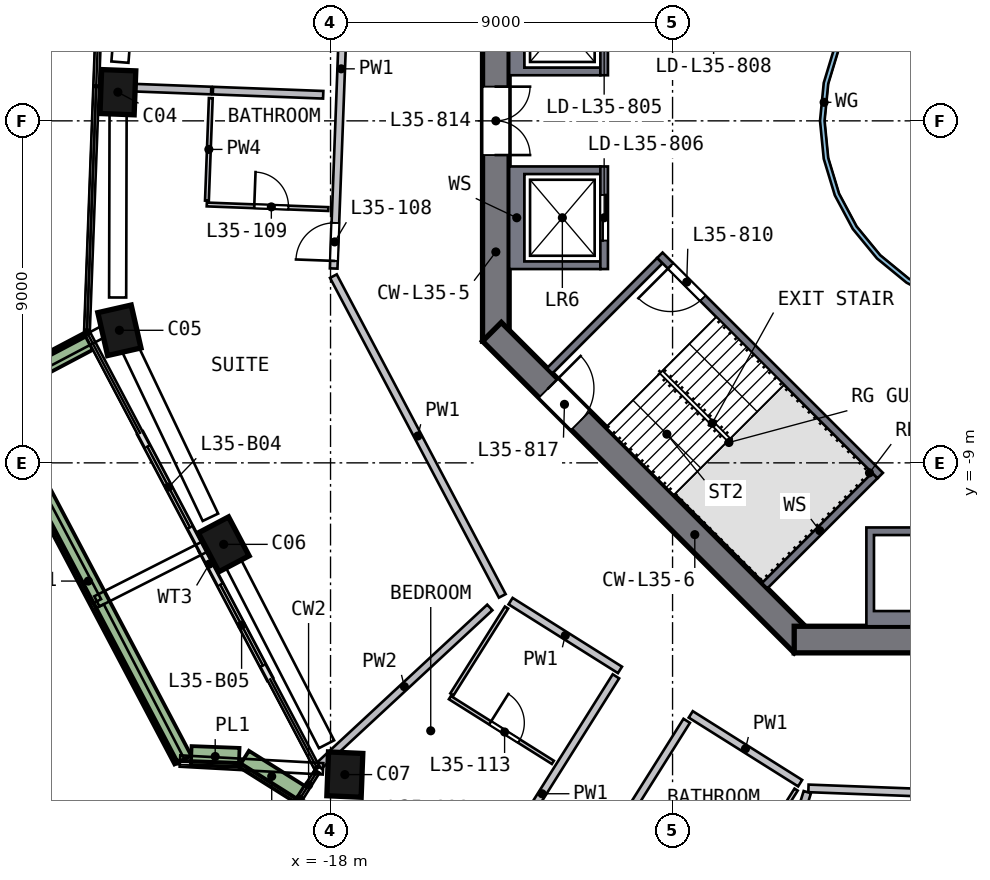
"""IFC4 building model, lengths in metres.
Left out: names, types, materials, properties, quantities, classifications, styles, units other than length and angle.
Written with IfcOpenShell. Run it as: python <this file> out.ifc"""

import sys

from ifc_helpers import new_model, si_unit, direction, frame, frame_2d, origin, origin_2d, place, context, subcontext, project, spatial, polyline, rectangle, outline, extrude, element, fill, save


model = new_model("IFC4")
c1 = context("Model", 3, precision=1e-05, world=origin(), true_north=direction((0.0, 1.0)))
c2 = subcontext(c1, "Body", "Model", "MODEL_VIEW")
j1 = project(units=[si_unit("LENGTHUNIT", "METRE"), si_unit("PLANEANGLEUNIT", "RADIAN")], contexts=[c1])
p1 = place(None, origin())
s1 = spatial("IfcSite", under=j1, at=p1, CompositionType="ELEMENT")
p2 = place(p1, origin())
s2 = spatial("IfcBuilding", under=s1, at=p2, CompositionType="ELEMENT")
p3 = place(p2, frame((0.0, 0.0, 147.0)))
s3 = spatial("IfcBuildingStorey", under=s2, at=p3, CompositionType="ELEMENT", Elevation=147.0)
p4 = place(p3, frame((-23.592, 0.89, 0.0), z_axis=(-0.003270139, -0.112325487, 0.993666086), x_axis=(-0.037343403, -0.992964581, -0.112369084)))
e1 = element("IfcColumn", 1, at=p4, inside=s3, PredefinedType="COLUMN", context=c2, shape_type="SweptSolid", body=[
    extrude(rectangle(XDim=1.15, YDim=0.9, at=origin_2d()), origin(), (0.0, 0.0, 1.0), 3.21),
])
p5 = place(p3, frame((-23.588, -5.376, 0.0), z_axis=(0.026457095, -0.111986495, 0.993357462), x_axis=(-0.220180272, 0.968648872, 0.115065247)))
e2 = element("IfcColumn", 2, at=p5, inside=s3, PredefinedType="COLUMN", context=c2, shape_type="SweptSolid", body=[
    extrude(rectangle(XDim=1.15, YDim=0.9, at=origin_2d()), origin(), (0.0, 0.0, 1.0), 3.211),
])
p6 = place(p3, frame((-20.876, -11.025, 0.0), z_axis=(0.053235348, -0.098865646, 0.993675793), x_axis=(0.463661004, -0.878869132, -0.112283222)))
e3 = element("IfcColumn", 3, at=p6, inside=s3, PredefinedType="COLUMN", context=c2, shape_type="SweptSolid", body=[
    extrude(rectangle(XDim=1.15, YDim=0.9, at=origin_2d()), origin(), (0.0, 0.0, 1.0), 3.21),
])
p7 = place(p3, frame((-17.723, -17.103, 0.0), z_axis=(0.082012432, -0.083608596, 0.993118102), x_axis=(0.044637607, 0.9957831, 0.08014675)))
e4 = element("IfcColumn", 4, at=p7, inside=s3, PredefinedType="COLUMN", context=c2, shape_type="SweptSolid", body=[
    extrude(rectangle(XDim=1.15, YDim=0.9, at=origin_2d()), origin(), (0.0, 0.0, 1.0), 3.212),
])
p8 = place(p3, frame((-13.65, 5.799, 0.0), z_axis=(0.0, 0.0, 1.0), x_axis=(0.0, -1.0, 0.0)))
e5 = element("IfcWall", 5, at=p8, inside=s3, PredefinedType="SHEAR", context=c2, shape_type="SweptSolid", body=[
    extrude(rectangle(XDim=11.598, YDim=0.7, at=frame_2d((5.799, 0.0))), origin(), (0.0, 0.0, 1.0), 3.5),
])
p9 = place(p8, frame((4.899, 0.0, 0.0)))
e6 = element("IfcOpeningElement", 6, at=p9, cuts=e5, PredefinedType="OPENING", context=c2, shape_type="SweptSolid", body=[
    extrude(rectangle(XDim=1.8, YDim=2.1, at=frame_2d((0.9, 1.05))), frame((0.0, 0.36, 0.0), z_axis=(0.0, -1.0, 0.0), x_axis=(1.0, 0.0, 0.0)), (0.0, 0.0, 1.0), 0.72),
])
p10 = place(p3, frame((-13.752, -5.552, 0.0), z_axis=(0.0, 0.0, 1.0), x_axis=(0.707106781, -0.707106781, 0.0)))
e7 = element("IfcWall", 7, at=p10, inside=s3, PredefinedType="SHEAR", context=c2, shape_type="SweptSolid", body=[
    extrude(rectangle(XDim=11.598, YDim=0.7, at=frame_2d((5.799, 0.0))), origin(), (0.0, 0.0, 1.0), 3.5),
])
p11 = place(p10, frame((2.099, 0.0, 0.0)))
e8 = element("IfcOpeningElement", 8, at=p11, cuts=e7, PredefinedType="OPENING", context=c2, shape_type="SweptSolid", body=[
    extrude(rectangle(XDim=1.2, YDim=2.1, at=frame_2d((0.6, 1.05))), frame((0.0, 0.36, 0.0), z_axis=(0.0, -1.0, 0.0), x_axis=(1.0, 0.0, 0.0)), (0.0, 0.0, 1.0), 0.72),
])
p12 = place(p3, frame((-5.799, -13.65, 0.0), z_axis=(0.0, 0.0, 1.0), x_axis=(1.0, 0.0, 0.0)))
e9 = element("IfcWall", 9, at=p12, inside=s3, PredefinedType="SHEAR", context=c2, shape_type="SweptSolid", body=[
    extrude(rectangle(XDim=11.598, YDim=0.7, at=frame_2d((5.799, 0.0))), origin(), (0.0, 0.0, 1.0), 3.5),
])
p13 = place(p12, frame((4.899, 0.0, 0.0)))
e10 = element("IfcOpeningElement", 10, at=p13, cuts=e9, PredefinedType="OPENING", context=c2, shape_type="SweptSolid", body=[
    extrude(rectangle(XDim=1.8, YDim=2.1, at=frame_2d((0.9, 1.05))), frame((0.0, 0.36, 0.0), z_axis=(0.0, -1.0, 0.0), x_axis=(1.0, 0.0, 0.0)), (0.0, 0.0, 1.0), 0.72),
])
p14 = place(p3, frame((-18.907, -17.859, 0.0), z_axis=(0.0, 0.0, 1.0), x_axis=(0.846576204, -0.532267537, 0.0)))
e11 = element("IfcWall", 11, at=p14, inside=s3, PredefinedType="SOLIDWALL", context=c2, shape_type="SweptSolid", body=[
    extrude(rectangle(XDim=1.875, YDim=0.15, at=frame_2d((0.938, 0.0))), origin(), (0.0, 0.0, 1.0), 3.19),
])
p15 = place(p3, frame((-23.007, -8.221, 0.0), z_axis=(0.0, 0.0, 1.0), x_axis=(0.466999775, -0.884257434, 0.0)))
e12 = element("IfcWall", 12, at=p15, inside=s3, PredefinedType="SOLIDWALL", context=c2, shape_type="SweptSolid", body=[
    extrude(rectangle(XDim=3.475, YDim=0.15, at=frame_2d((1.737, 0.0))), origin(), (0.0, 0.0, 1.0), 2.475),
])
p16 = place(p15, frame((0.4, 0.0, 0.0)))
e13 = element("IfcOpeningElement", 13, at=p16, cuts=e12, PredefinedType="OPENING", context=c2, shape_type="SweptSolid", body=[
    extrude(rectangle(XDim=2.4, YDim=2.4, at=frame_2d((1.2, 1.2))), frame((0.0, 0.085, 0.0), z_axis=(0.0, -1.0, 0.0), x_axis=(1.0, 0.0, 0.0)), (0.0, 0.0, 1.0), 0.17),
])
p17 = place(p3, frame((-21.384, -11.294, 0.0), z_axis=(0.0, 0.0, 1.0), x_axis=(0.467013054, -0.884250421, 0.0)))
e14 = element("IfcWall", 14, at=p17, inside=s3, PredefinedType="SOLIDWALL", context=c2, shape_type="SweptSolid", body=[
    extrude(rectangle(XDim=3.835, YDim=0.15, at=frame_2d((1.918, 0.0))), origin(), (0.0, 0.0, 1.0), 2.475),
])
p18 = place(p17, frame((1.035, 0.0, 0.0)))
e15 = element("IfcOpeningElement", 15, at=p18, cuts=e14, PredefinedType="OPENING", context=c2, shape_type="SweptSolid", body=[
    extrude(rectangle(XDim=2.4, YDim=2.4, at=frame_2d((1.2, 1.2))), frame((0.0, 0.085, 0.0), z_axis=(0.0, -1.0, 0.0), x_axis=(1.0, 0.0, 0.0)), (0.0, 0.0, 1.0), 0.17),
])
p19 = place(p3, frame((-24.37, -5.802, 0.0), z_axis=(0.0, 0.0, 1.0), x_axis=(-0.884238577, -0.467035479, 0.0)))
e16 = element("IfcWall", 16, at=p19, inside=s3, PredefinedType="SOLIDWALL", context=c2, shape_type="SweptSolid", body=[
    extrude(rectangle(XDim=3.199, YDim=0.5, at=frame_2d((1.6, 0.0))), origin(), (0.0, 0.0, 1.0), 0.7),
])
p20 = place(p3, frame((-26.861, -7.401, 0.0), z_axis=(0.0, 0.0, 1.0), x_axis=(0.466996617, -0.884259102, 0.0)))
e17 = element("IfcWall", 17, at=p20, inside=s3, PredefinedType="SOLIDWALL", context=c2, shape_type="SweptSolid", body=[
    extrude(rectangle(XDim=10.652, YDim=0.5, at=frame_2d((5.326, 0.0))), origin(), (0.0, 0.0, 1.0), 0.7),
])
p21 = place(p3, frame((-21.665, -16.704, 0.0), z_axis=(0.0, 0.0, 1.0), x_axis=(0.999288074, -0.037727236, 0.0)))
e18 = element("IfcWall", 18, at=p21, inside=s3, PredefinedType="SOLIDWALL", context=c2, shape_type="SweptSolid", body=[
    extrude(rectangle(XDim=1.262, YDim=0.5, at=frame_2d((0.631, 0.0))), origin(), (0.0, 0.0, 1.0), 0.7),
])
p22 = place(p3, frame((-20.281, -16.789, 0.0), z_axis=(0.0, 0.0, 1.0), x_axis=(0.846553018, -0.532304413, 0.0)))
e19 = element("IfcWall", 19, at=p22, inside=s3, PredefinedType="SOLIDWALL", context=c2, shape_type="SweptSolid", body=[
    extrude(rectangle(XDim=1.731, YDim=0.5, at=frame_2d((0.865, 0.0))), origin(), (0.0, 0.0, 1.0), 0.7),
])
p23 = place(p3, origin())
e20 = element("IfcWall", 20, at=p23, inside=s3, PredefinedType="SOLIDWALL", context=c2, shape_type="SweptSolid", body=[
    extrude(outline(polyline([(-13.3, 3.9), (-10.9, 3.9), (-10.9, 3.7), (-12.9, 3.7), (-12.9, 1.4), (-10.9, 1.4), (-10.9, 1.2), (-13.3, 1.2), (-13.3, 3.9)])), origin(), (0.0, 0.0, 1.0), 3.19),
])
p24 = place(p3, frame((-10.8, 1.2, 0.0), z_axis=(0.0, 0.0, 1.0), x_axis=(0.0, 1.0, 0.0)))
e21 = element("IfcWall", 21, at=p24, inside=s3, PredefinedType="SOLIDWALL", context=c2, shape_type="SweptSolid", body=[
    extrude(rectangle(XDim=2.7, YDim=0.2, at=frame_2d((1.35, 0.0))), origin(), (0.0, 0.0, 1.0), 3.19),
])
p25 = place(p24, frame((0.75, 0.0, 0.0)))
e22 = element("IfcOpeningElement", 22, at=p25, cuts=e21, PredefinedType="OPENING", context=c2, shape_type="SweptSolid", body=[
    extrude(rectangle(XDim=1.2, YDim=2.1, at=frame_2d((0.6, 1.05))), frame((0.0, 0.11, 0.0), z_axis=(0.0, -1.0, 0.0), x_axis=(1.0, 0.0, 0.0)), (0.0, 0.0, 1.0), 0.22),
])
p26 = place(p3, origin())
e23 = element("IfcWall", 23, at=p26, inside=s3, PredefinedType="SOLIDWALL", context=c2, shape_type="SweptSolid", body=[
    extrude(outline(polyline([(-13.3, -3.9), (-13.3, -1.2), (-10.9, -1.2), (-10.9, -1.4), (-12.9, -1.4), (-12.9, -3.7), (-10.9, -3.7), (-10.9, -3.9), (-13.3, -3.9)])), origin(), (0.0, 0.0, 1.0), 3.19),
])
p27 = place(p3, frame((-10.8, -1.2, 0.0), z_axis=(0.0, 0.0, 1.0), x_axis=(0.0, -1.0, 0.0)))
e24 = element("IfcWall", 24, at=p27, inside=s3, PredefinedType="SOLIDWALL", context=c2, shape_type="SweptSolid", body=[
    extrude(rectangle(XDim=2.7, YDim=0.2, at=frame_2d((1.35, 0.0))), origin(), (0.0, 0.0, 1.0), 3.19),
])
p28 = place(p27, frame((0.75, 0.0, 0.0)))
e25 = element("IfcOpeningElement", 25, at=p28, cuts=e24, PredefinedType="OPENING", context=c2, shape_type="SweptSolid", body=[
    extrude(rectangle(XDim=1.2, YDim=2.1, at=frame_2d((0.6, 1.05))), frame((0.0, 0.11, 0.0), z_axis=(0.0, -1.0, 0.0), x_axis=(1.0, 0.0, 0.0)), (0.0, 0.0, 1.0), 0.22),
])
p29 = place(p3, origin())
e26 = element("IfcWall", 26, at=p29, inside=s3, PredefinedType="SOLIDWALL", context=c2, shape_type="SweptSolid", body=[
    extrude(outline(polyline([(-1.2, -13.3), (-3.9, -13.3), (-3.9, -10.7), (-1.2, -10.7), (-1.2, -13.3)]), holes=[polyline([(-3.7, -10.9), (-3.7, -12.9), (-1.4, -12.9), (-1.4, -10.9), (-3.7, -10.9)])]), origin(), (0.0, 0.0, 1.0), 3.19),
])
p30 = place(p3, frame((-3.535, -9.334, 0.0), z_axis=(0.0, 0.0, 1.0), x_axis=(-0.707106781, 0.707106781, 0.0)))
e27 = element("IfcWall", 27, at=p30, inside=s3, PredefinedType="SOLIDWALL", context=c2, shape_type="SweptSolid", body=[
    extrude(rectangle(XDim=8.2, YDim=0.2, at=frame_2d((4.1, 0.0))), origin(), (0.0, 0.0, 1.0), 3.19),
])
p31 = place(p30, frame((6.6, 0.0, 0.0)))
e28 = element("IfcOpeningElement", 28, at=p31, cuts=e27, PredefinedType="OPENING", context=c2, shape_type="SweptSolid", body=[
    extrude(rectangle(XDim=1.2, YDim=2.1, at=frame_2d((0.6, 1.05))), frame((0.0, 0.11, 0.0), z_axis=(0.0, -1.0, 0.0), x_axis=(1.0, 0.0, 0.0)), (0.0, 0.0, 1.0), 0.22),
])
for number, where, z_axis, x_axis in (
    (29, (-9.334, -3.677, 0.0), (0.0, 0.0, 1.0), (-0.707, -0.707, 0.0)),
    (30, (-3.677, -9.334, 0.0), (0.0, 0.0, 1.0), (-0.707, -0.707, 0.0)),
):
    element("IfcWall", number, at=place(p3, frame(where, z_axis=z_axis, x_axis=x_axis)), inside=s3, PredefinedType="SOLIDWALL", context=c2, shape_type="SweptSolid", body=[
        extrude(rectangle(XDim=4.1, YDim=0.2, at=frame_2d((2.05, 0.0))), origin(), (0.0, 0.0, 1.0), 3.19),
    ])
p32 = place(p3, origin())
e31 = element("IfcWall", 31, at=p32, inside=s3, PredefinedType="SOLIDWALL", context=c2, shape_type="SweptSolid", body=[
    extrude(outline(polyline([(5.021, -0.999), (4.73, -1.959), (4.257, -2.844), (3.62, -3.62), (2.844, -4.257), (1.959, -4.73), (0.999, -5.021), (0.0, -5.12), (-0.999, -5.021), (-1.959, -4.73), (-2.844, -4.257), (-3.62, -3.62), (-4.257, -2.844), (-4.73, -1.959), (-5.021, -0.999), (-5.12, 0.0), (-5.021, 0.999), (-4.73, 1.959), (-4.257, 2.844), (-3.62, 3.62), (-2.844, 4.257), (-1.959, 4.73), (-0.999, 5.021), (0.0, 5.12), (0.999, 5.021), (1.959, 4.73), (2.844, 4.257), (3.62, 3.62), (4.257, 2.844), (4.73, 1.959), (5.021, 0.999), (5.12, 0.0), (5.021, -0.999)]), holes=[polyline([(4.904, 0.976), (4.619, 1.913), (4.157, 2.778), (3.535, 3.535), (2.778, 4.157), (1.913, 4.619), (0.976, 4.904), (0.0, 5.0), (-0.976, 4.904), (-1.913, 4.619), (-2.778, 4.157), (-3.535, 3.535), (-4.157, 2.778), (-4.619, 1.913), (-4.904, 0.976), (-5.0, 0.0), (-4.904, -0.976), (-4.619, -1.913), (-4.157, -2.778), (-3.535, -3.535), (-2.778, -4.157), (-1.913, -4.619), (-0.976, -4.904), (0.0, -5.0), (0.976, -4.904), (1.913, -4.619), (2.778, -4.157), (3.535, -3.535), (4.157, -2.778), (4.619, -1.913), (4.904, -0.976), (5.0, 0.0), (4.904, 0.976)])]), origin(), (0.0, 0.0, 1.0), 3.19),
])
p33 = place(p3, frame((-17.917, -3.885, 0.0), z_axis=(0.0, 0.0, 1.0), x_axis=(0.037683274, 0.999289733, 0.0)))
e32 = element("IfcWall", 32, at=p33, inside=s3, PredefinedType="SOLIDWALL", context=c2, shape_type="SweptSolid", body=[
    extrude(rectangle(XDim=9.116, YDim=0.2, at=frame_2d((4.558, 0.0))), origin(), (0.0, 0.0, 1.0), 3.19),
])
p34 = place(p33, frame((0.2, 0.0, 0.0)))
e33 = element("IfcOpeningElement", 33, at=p34, cuts=e32, PredefinedType="OPENING", context=c2, shape_type="SweptSolid", body=[
    extrude(rectangle(XDim=1.0, YDim=2.1, at=frame_2d((0.5, 1.05))), frame((0.0, 0.11, 0.0), z_axis=(0.0, -1.0, 0.0), x_axis=(1.0, 0.0, 0.0)), (0.0, 0.0, 1.0), 0.22),
])
p35 = place(p3, frame((-17.925, -4.086, 0.0), z_axis=(0.0, 0.0, 1.0), x_axis=(0.467011659, -0.884251158, 0.0)))
e34 = element("IfcWall", 34, at=p35, inside=s3, PredefinedType="SOLIDWALL", context=c2, shape_type="SweptSolid", body=[
    extrude(rectangle(XDim=9.516, YDim=0.2, at=frame_2d((4.758, 0.0))), origin(), (0.0, 0.0, 1.0), 3.19),
])
p36 = place(p3, frame((-10.49, -14.617, 0.0), z_axis=(0.0, 0.0, 1.0), x_axis=(-0.532290716, -0.84656163, 0.0)))
e35 = element("IfcWall", 35, at=p36, inside=s3, PredefinedType="SOLIDWALL", context=c2, shape_type="SweptSolid", body=[
    extrude(rectangle(XDim=7.3, YDim=0.2, at=frame_2d((3.65, 0.0))), origin(), (0.0, 0.0, 1.0), 3.19),
])
p37 = place(p3, frame((-13.262, -12.638, 0.0), z_axis=(0.0, 0.0, 1.0), x_axis=(0.846546871, -0.532314188, 0.0)))
e36 = element("IfcWall", 36, at=p37, inside=s3, PredefinedType="SOLIDWALL", context=c2, shape_type="SweptSolid", body=[
    extrude(rectangle(XDim=3.4, YDim=0.2, at=frame_2d((1.7, 0.0))), origin(), (0.0, 0.0, 1.0), 3.19),
])
p38 = place(p3, frame((-12.513, -21.968, 0.0), z_axis=(0.0, 0.0, 1.0), x_axis=(0.532290716, 0.84656163, 0.0)))
e37 = element("IfcWall", 37, at=p38, inside=s3, PredefinedType="SOLIDWALL", context=c2, shape_type="SweptSolid", body=[
    extrude(rectangle(XDim=7.3, YDim=0.2, at=frame_2d((3.65, 0.0))), origin(), (0.0, 0.0, 1.0), 3.19),
])
p39 = place(p3, frame((-8.521, -15.619, 0.0), z_axis=(0.0, 0.0, 1.0), x_axis=(0.846546871, -0.532314188, 0.0)))
e38 = element("IfcWall", 38, at=p39, inside=s3, PredefinedType="SOLIDWALL", context=c2, shape_type="SweptSolid", body=[
    extrude(rectangle(XDim=3.4, YDim=0.2, at=frame_2d((1.7, 0.0))), origin(), (0.0, 0.0, 1.0), 3.19),
])
p40 = place(p3, frame((4.086, -17.925, 0.0), z_axis=(0.0, 0.0, 1.0), x_axis=(-0.999289656, 0.037685326, 0.0)))
e39 = element("IfcWall", 39, at=p40, inside=s3, PredefinedType="SOLIDWALL", context=c2, shape_type="SweptSolid", body=[
    extrude(rectangle(XDim=9.517, YDim=0.2, at=frame_2d((4.758, 0.0))), origin(), (0.0, 0.0, 1.0), 3.19),
])
p41 = place(p40, frame((1.9, 0.0, 0.0)))
e40 = element("IfcOpeningElement", 40, at=p41, cuts=e39, PredefinedType="OPENING", context=c2, shape_type="SweptSolid", body=[
    extrude(rectangle(XDim=1.0, YDim=2.1, at=frame_2d((0.5, 1.05))), frame((0.0, 0.11, 0.0), z_axis=(0.0, -1.0, 0.0), x_axis=(1.0, 0.0, 0.0)), (0.0, 0.0, 1.0), 0.22),
])
p42 = place(p3, frame((-21.141, 0.797, 0.0), z_axis=(0.0, 0.0, 1.0), x_axis=(-0.999288645, 0.037712126, 0.0)))
e41 = element("IfcWall", 41, at=p42, inside=s3, PredefinedType="SOLIDWALL", context=c2, shape_type="SweptSolid", body=[
    extrude(rectangle(XDim=2.952, YDim=0.2, at=frame_2d((1.476, 0.0))), origin(), (0.0, 0.0, 1.0), 3.19),
])
p43 = place(p3, frame((-18.193, 0.686, 0.0), z_axis=(0.0, 0.0, 1.0), x_axis=(-0.999290793, 0.037655167, 0.0)))
e42 = element("IfcWall", 42, at=p43, inside=s3, PredefinedType="SOLIDWALL", context=c2, shape_type="SweptSolid", body=[
    extrude(rectangle(XDim=2.905, YDim=0.2, at=frame_2d((1.452, 0.0))), origin(), (0.0, 0.0, 1.0), 3.19),
])
p44 = place(p3, frame((-13.809, -12.805, 0.0), z_axis=(0.0, 0.0, 1.0), x_axis=(-0.733259856, -0.679948516, 0.0)))
e43 = element("IfcWall", 43, at=p44, inside=s3, PredefinedType="SOLIDWALL", context=c2, shape_type="SweptSolid", body=[
    extrude(rectangle(XDim=6.132, YDim=0.2, at=frame_2d((3.066, 0.0))), origin(), (0.0, 0.0, 1.0), 3.19),
])
p45 = place(p3, frame((-5.455, -17.665, 0.0), z_axis=(0.0, 0.0, 1.0), x_axis=(-0.2950443, -0.955483574, 0.0)))
e44 = element("IfcWall", 44, at=p45, inside=s3, PredefinedType="SOLIDWALL", context=c2, shape_type="SweptSolid", body=[
    extrude(rectangle(XDim=3.418, YDim=0.2, at=frame_2d((1.709, 0.0))), origin(), (0.0, 0.0, 1.0), 3.19),
])
p46 = place(p3, frame((-21.253, -2.101, 0.0), z_axis=(0.0, 0.0, 1.0), x_axis=(0.037703899, 0.999288955, 0.0)))
e45 = element("IfcWall", 45, at=p46, inside=s3, PredefinedType="PARTITIONING", context=c2, shape_type="SweptSolid", body=[
    extrude(rectangle(XDim=2.7, YDim=0.1, at=frame_2d((1.35, 0.0))), origin(), (0.0, 0.0, 1.0), 3.19),
])
p47 = place(p3, frame((-21.256, -2.2, 0.0), z_axis=(0.0, 0.0, 1.0), x_axis=(0.999289522, -0.037688886, 0.0)))
e46 = element("IfcWall", 46, at=p47, inside=s3, PredefinedType="PARTITIONING", context=c2, shape_type="SweptSolid", body=[
    extrude(rectangle(XDim=3.2, YDim=0.1, at=frame_2d((1.6, 0.0))), origin(), (0.0, 0.0, 1.0), 3.19),
])
p48 = place(p47, frame((1.25, 0.0, 0.0)))
e47 = element("IfcOpeningElement", 47, at=p48, cuts=e46, PredefinedType="OPENING", context=c2, shape_type="SweptSolid", body=[
    extrude(rectangle(XDim=0.9, YDim=2.1, at=frame_2d((0.45, 1.05))), frame((0.0, 0.06, 0.0), z_axis=(0.0, -1.0, 0.0), x_axis=(1.0, 0.0, 0.0)), (0.0, 0.0, 1.0), 0.12),
])
p49 = place(p3, frame((-13.368, -12.808, 0.0), z_axis=(0.0, 0.0, 1.0), x_axis=(-0.532321537, -0.84654225, 0.0)))
e48 = element("IfcWall", 48, at=p49, inside=s3, PredefinedType="PARTITIONING", context=c2, shape_type="SweptSolid", body=[
    extrude(rectangle(XDim=2.7, YDim=0.1, at=frame_2d((1.35, 0.0))), origin(), (0.0, 0.0, 1.0), 3.19),
])
p50 = place(p3, frame((-14.859, -15.178, 0.0), z_axis=(0.0, 0.0, 1.0), x_axis=(0.846555022, -0.532301225, 0.0)))
e49 = element("IfcWall", 49, at=p50, inside=s3, PredefinedType="PARTITIONING", context=c2, shape_type="SweptSolid", body=[
    extrude(rectangle(XDim=3.2, YDim=0.1, at=frame_2d((1.6, 0.0))), origin(), (0.0, 0.0, 1.0), 3.19),
])
p51 = place(p50, frame((1.25, 0.0, 0.0)))
e50 = element("IfcOpeningElement", 50, at=p51, cuts=e49, PredefinedType="OPENING", context=c2, shape_type="SweptSolid", body=[
    extrude(rectangle(XDim=0.9, YDim=2.1, at=frame_2d((0.45, 1.05))), frame((0.0, 0.06, 0.0), z_axis=(0.0, -1.0, 0.0), x_axis=(1.0, 0.0, 0.0)), (0.0, 0.0, 1.0), 0.12),
])
p52 = place(p3, frame((-7.187, -19.884, 0.0), z_axis=(0.0, 0.0, 1.0), x_axis=(0.532256732, 0.846582997, 0.0)))
e51 = element("IfcWall", 51, at=p52, inside=s3, PredefinedType="PARTITIONING", context=c2, shape_type="SweptSolid", body=[
    extrude(rectangle(XDim=2.7, YDim=0.1, at=frame_2d((1.35, 0.0))), origin(), (0.0, 0.0, 1.0), 3.19),
])
p53 = place(p16, origin())
e52 = element("IfcDoor", 52, at=p53, inside=s3, OperationType="SLIDING_TO_RIGHT", PredefinedType="DOOR", context=c2, shape_type="SweptSolid", body=[
    extrude(rectangle(XDim=2.4, YDim=2.4, at=frame_2d((1.2, 1.2))), frame((0.0, 0.025, 0.0), z_axis=(0.0, -1.0, 0.0), x_axis=(1.0, 0.0, 0.0)), (0.0, 0.0, 1.0), 0.05),
])
fill(e13, e52)
p54 = place(p18, origin())
e53 = element("IfcDoor", 53, at=p54, inside=s3, OperationType="SLIDING_TO_LEFT", PredefinedType="DOOR", context=c2, shape_type="SweptSolid", body=[
    extrude(rectangle(XDim=2.4, YDim=2.4, at=frame_2d((1.2, 1.2))), frame((0.0, 0.025, 0.0), z_axis=(0.0, -1.0, 0.0), x_axis=(1.0, 0.0, 0.0)), (0.0, 0.0, 1.0), 0.05),
])
fill(e15, e53)
p55 = place(p28, origin())
e54 = element("IfcDoor", 54, at=p55, inside=s3, OperationType="DOUBLE_DOOR_SLIDING", PredefinedType="DOOR", context=c2, shape_type="SweptSolid", body=[
    extrude(rectangle(XDim=1.2, YDim=2.1, at=frame_2d((0.6, 1.05))), frame((0.0, 0.025, 0.0), z_axis=(0.0, -1.0, 0.0), x_axis=(1.0, 0.0, 0.0)), (0.0, 0.0, 1.0), 0.05),
])
fill(e25, e54)
p56 = place(p31, origin())
e55 = element("IfcDoor", 55, at=p56, inside=s3, OperationType="SINGLE_SWING_RIGHT", PredefinedType="DOOR", context=c2, shape_type="SweptSolid", body=[
    extrude(rectangle(XDim=1.2, YDim=2.1, at=frame_2d((0.6, 1.05))), frame((0.0, 0.025, 0.0), z_axis=(0.0, -1.0, 0.0), x_axis=(1.0, 0.0, 0.0)), (0.0, 0.0, 1.0), 0.05),
])
fill(e28, e55)
p57 = place(p9, origin())
e56 = element("IfcDoor", 56, at=p57, inside=s3, OperationType="DOUBLE_DOOR_SINGLE_SWING", PredefinedType="DOOR", context=c2, shape_type="SweptSolid", body=[
    extrude(rectangle(XDim=1.8, YDim=2.1, at=frame_2d((0.9, 1.05))), frame((0.0, 0.025, 0.0), z_axis=(0.0, -1.0, 0.0), x_axis=(1.0, 0.0, 0.0)), (0.0, 0.0, 1.0), 0.05),
])
fill(e6, e56)
p58 = place(p11, origin())
e57 = element("IfcDoor", 57, at=p58, inside=s3, OperationType="SINGLE_SWING_LEFT", PredefinedType="DOOR", context=c2, shape_type="SweptSolid", body=[
    extrude(rectangle(XDim=1.2, YDim=2.1, at=frame_2d((0.6, 1.05))), frame((0.0, 0.025, 0.0), z_axis=(0.0, -1.0, 0.0), x_axis=(1.0, 0.0, 0.0)), (0.0, 0.0, 1.0), 0.05),
])
fill(e8, e57)
p59 = place(p34, origin())
e58 = element("IfcDoor", 58, at=p59, inside=s3, OperationType="SINGLE_SWING_LEFT", PredefinedType="DOOR", context=c2, shape_type="SweptSolid", body=[
    extrude(rectangle(XDim=1.0, YDim=2.1, at=frame_2d((0.5, 1.05))), frame((0.0, 0.025, 0.0), z_axis=(0.0, -1.0, 0.0), x_axis=(1.0, 0.0, 0.0)), (0.0, 0.0, 1.0), 0.05),
])
fill(e33, e58)
p60 = place(p48, origin())
e59 = element("IfcDoor", 59, at=p60, inside=s3, OperationType="SINGLE_SWING_LEFT", PredefinedType="DOOR", context=c2, shape_type="SweptSolid", body=[
    extrude(rectangle(XDim=0.9, YDim=2.1, at=frame_2d((0.45, 1.05))), frame((0.0, 0.025, 0.0), z_axis=(0.0, -1.0, 0.0), x_axis=(1.0, 0.0, 0.0)), (0.0, 0.0, 1.0), 0.05),
])
fill(e47, e59)
p61 = place(p51, origin())
e60 = element("IfcDoor", 60, at=p61, inside=s3, OperationType="SINGLE_SWING_LEFT", PredefinedType="DOOR", context=c2, shape_type="SweptSolid", body=[
    extrude(rectangle(XDim=0.9, YDim=2.1, at=frame_2d((0.45, 1.05))), frame((0.0, 0.025, 0.0), z_axis=(0.0, -1.0, 0.0), x_axis=(1.0, 0.0, 0.0)), (0.0, 0.0, 1.0), 0.05),
])
fill(e50, e60)
save(model, sys.argv[1])
